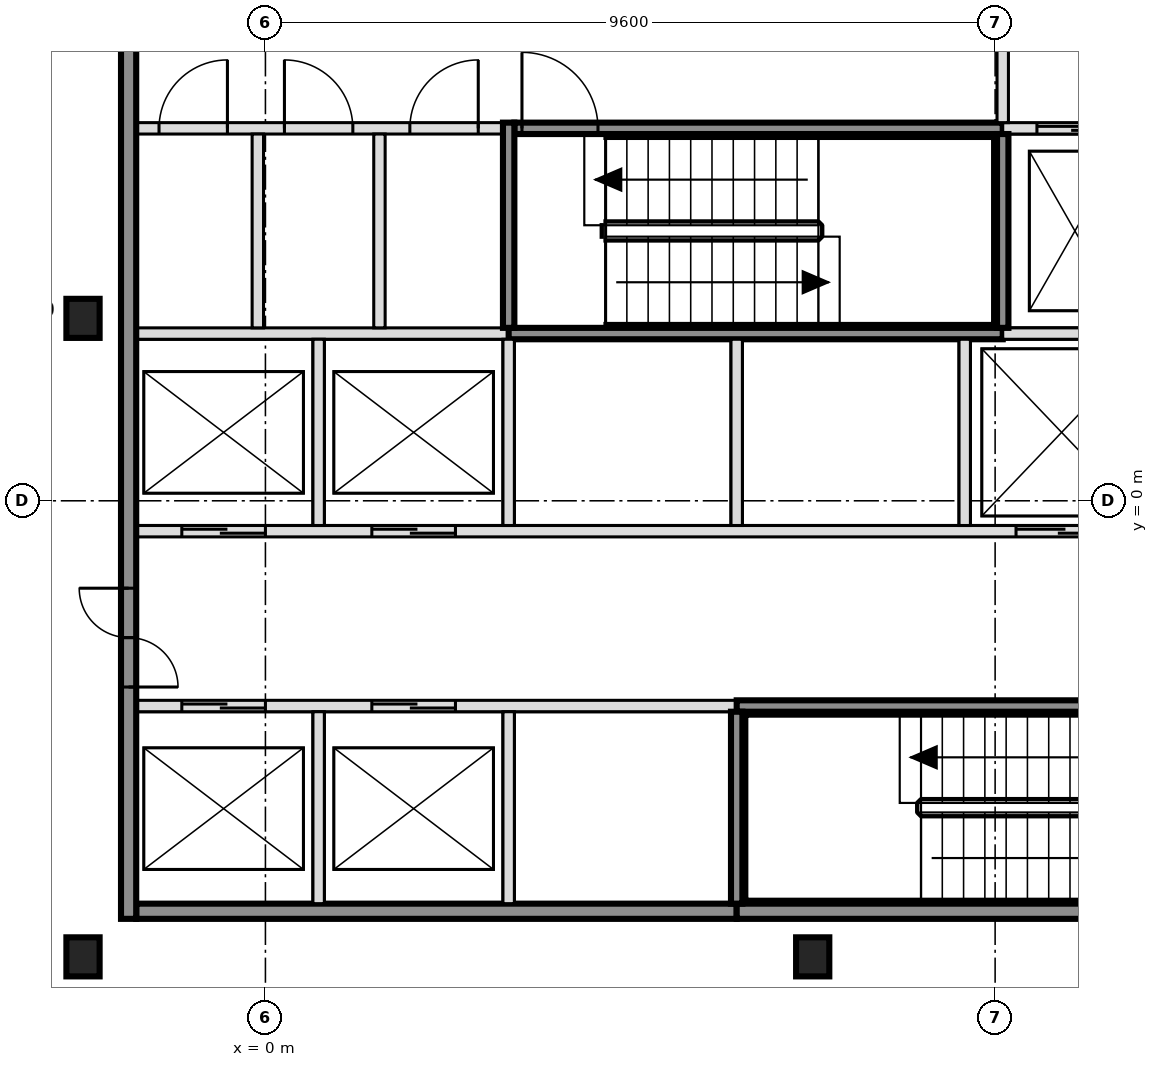
"""IFC4 building model, lengths in metres.
Left out: names, types, materials, properties, quantities, classifications, styles, units other than length and angle.
Written with IfcOpenShell. Run it as: python <this file> out.ifc"""

import sys

from ifc_helpers import new_model, si_unit, direction, frame, frame_2d, origin, origin_2d, place, context, subcontext, project, spatial, rectangle, i_section, extrude, element, fill, save


model = new_model("IFC4")
c1 = context("Model", 3, precision=1e-05, world=origin(), true_north=direction((0.0, 1.0)))
c2 = subcontext(c1, "Body", "Model", "MODEL_VIEW")
j1 = project(units=[si_unit("LENGTHUNIT", "METRE"), si_unit("PLANEANGLEUNIT", "RADIAN")], contexts=[c1])
p1 = place(None, origin())
s1 = spatial("IfcSite", under=j1, at=p1, CompositionType="ELEMENT")
p2 = place(p1, origin())
s2 = spatial("IfcBuilding", under=s1, at=p2, CompositionType="ELEMENT")
p3 = place(p2, frame((0.0, 0.0, 76.2)))
s3 = spatial("IfcBuildingStorey", under=s2, at=p3, CompositionType="ELEMENT", Elevation=76.2)
for number, where, z_axis, x_axis in (
    (1, (-2.4, -6.0, -0.15), (0.0, 0.0, 1.0), (1.0, 0.0, 0.0)),
    (2, (7.2, -6.0, -0.15), (0.0, 0.0, 1.0), (1.0, 0.0, 0.0)),
    (3, (-2.4, 2.4, -0.15), (0.0, 0.0, 1.0), (1.0, 0.0, 0.0)),
):
    element("IfcColumn", number, at=place(p3, frame(where, z_axis=z_axis, x_axis=x_axis)), inside=s3, PredefinedType="COLUMN", context=c2, shape_type="SweptSolid", body=[
        extrude(i_section(OverallWidth=0.437, OverallDepth=0.514, WebThickness=0.061, FlangeThickness=0.097, FilletRadius=0.015, at=origin_2d()), origin(), (0.0, 0.0, 1.0), 3.6),
    ])
p4 = place(p3, frame((-1.7, -5.4, 0.0), z_axis=(0.0, 0.0, 1.0), x_axis=(1.0, 0.0, 0.0)))
e4 = element("IfcWall", 4, at=p4, inside=s3, PredefinedType="SOLIDWALL", context=c2, shape_type="SweptSolid", body=[
    extrude(rectangle(XDim=7.9, YDim=0.2, at=frame_2d((3.95, 0.0))), origin(), (0.0, 0.0, 1.0), 3.45),
])
p5 = place(p3, frame((6.2, -5.4, 0.0), z_axis=(0.0, 0.0, 1.0), x_axis=(1.0, 0.0, 0.0)))
e5 = element("IfcWall", 5, at=p5, inside=s3, PredefinedType="SOLIDWALL", context=c2, shape_type="SweptSolid", body=[
    extrude(rectangle(XDim=6.5, YDim=0.2, at=frame_2d((3.25, 0.0))), origin(), (0.0, 0.0, 1.0), 3.45),
])
p6 = place(p3, frame((-1.7, -2.7, 0.0), z_axis=(0.0, 0.0, 1.0), x_axis=(1.0, 0.0, 0.0)))
e6 = element("IfcWall", 6, at=p6, inside=s3, PredefinedType="SOLIDWALL", context=c2, shape_type="SweptSolid", body=[
    extrude(rectangle(XDim=7.9, YDim=0.15, at=frame_2d((3.95, 0.0))), origin(), (0.0, 0.0, 1.0), 3.45),
])
p7 = place(p6, frame((0.6, 0.0, 0.0)))
e7 = element("IfcOpeningElement", 7, at=p7, cuts=e6, PredefinedType="OPENING", context=c2, shape_type="SweptSolid", body=[
    extrude(rectangle(XDim=1.1, YDim=2.1, at=frame_2d((0.55, 1.05))), frame((0.0, 0.085, 0.0), z_axis=(0.0, -1.0, 0.0), x_axis=(1.0, 0.0, 0.0)), (0.0, 0.0, 1.0), 0.17),
])
p8 = place(p6, frame((3.1, 0.0, 0.0)))
e8 = element("IfcOpeningElement", 8, at=p8, cuts=e6, PredefinedType="OPENING", context=c2, shape_type="SweptSolid", body=[
    extrude(rectangle(XDim=1.1, YDim=2.1, at=frame_2d((0.55, 1.05))), frame((0.0, 0.085, 0.0), z_axis=(0.0, -1.0, 0.0), x_axis=(1.0, 0.0, 0.0)), (0.0, 0.0, 1.0), 0.17),
])
p9 = place(p3, frame((6.2, -2.7, 0.0), z_axis=(0.0, 0.0, 1.0), x_axis=(1.0, 0.0, 0.0)))
e9 = element("IfcWall", 9, at=p9, inside=s3, PredefinedType="SOLIDWALL", context=c2, shape_type="SweptSolid", body=[
    extrude(rectangle(XDim=6.425, YDim=0.15, at=frame_2d((3.212, 0.0))), origin(), (0.0, 0.0, 1.0), 3.45),
])
p10 = place(p9, frame((5.3, 0.0, 0.0)))
e10 = element("IfcOpeningElement", 10, at=p10, cuts=e9, PredefinedType="OPENING", context=c2, shape_type="SweptSolid", body=[
    extrude(rectangle(XDim=1.0, YDim=2.1, at=frame_2d((0.5, 1.05))), frame((0.0, 0.085, 0.0), z_axis=(0.0, -1.0, 0.0), x_axis=(1.0, 0.0, 0.0)), (0.0, 0.0, 1.0), 0.17),
])
p11 = place(p3, frame((-1.7, -0.4, 0.0), z_axis=(0.0, 0.0, 1.0), x_axis=(1.0, 0.0, 0.0)))
e11 = element("IfcWall", 11, at=p11, inside=s3, PredefinedType="SOLIDWALL", context=c2, shape_type="SweptSolid", body=[
    extrude(rectangle(XDim=15.925, YDim=0.15, at=frame_2d((7.962, 0.0))), origin(), (0.0, 0.0, 1.0), 3.45),
])
p12 = place(p11, frame((0.6, 0.0, 0.0)))
e12 = element("IfcOpeningElement", 12, at=p12, cuts=e11, PredefinedType="OPENING", context=c2, shape_type="SweptSolid", body=[
    extrude(rectangle(XDim=1.1, YDim=2.1, at=frame_2d((0.55, 1.05))), frame((0.0, 0.085, 0.0), z_axis=(0.0, -1.0, 0.0), x_axis=(1.0, 0.0, 0.0)), (0.0, 0.0, 1.0), 0.17),
])
p13 = place(p11, frame((3.1, 0.0, 0.0)))
e13 = element("IfcOpeningElement", 13, at=p13, cuts=e11, PredefinedType="OPENING", context=c2, shape_type="SweptSolid", body=[
    extrude(rectangle(XDim=1.1, YDim=2.1, at=frame_2d((0.55, 1.05))), frame((0.0, 0.085, 0.0), z_axis=(0.0, -1.0, 0.0), x_axis=(1.0, 0.0, 0.0)), (0.0, 0.0, 1.0), 0.17),
])
p14 = place(p11, frame((11.575, 0.0, 0.0)))
e14 = element("IfcOpeningElement", 14, at=p14, cuts=e11, PredefinedType="OPENING", context=c2, shape_type="SweptSolid", body=[
    extrude(rectangle(XDim=1.2, YDim=2.1, at=frame_2d((0.6, 1.05))), frame((0.0, 0.085, 0.0), z_axis=(0.0, -1.0, 0.0), x_axis=(1.0, 0.0, 0.0)), (0.0, 0.0, 1.0), 0.17),
])
p15 = place(p11, frame((14.125, 0.0, 0.0)))
e15 = element("IfcOpeningElement", 15, at=p15, cuts=e11, PredefinedType="OPENING", context=c2, shape_type="SweptSolid", body=[
    extrude(rectangle(XDim=1.2, YDim=2.1, at=frame_2d((0.6, 1.05))), frame((0.0, 0.085, 0.0), z_axis=(0.0, -1.0, 0.0), x_axis=(1.0, 0.0, 0.0)), (0.0, 0.0, 1.0), 0.17),
])
p16 = place(p3, frame((-1.7, 2.2, 0.0), z_axis=(0.0, 0.0, 1.0), x_axis=(1.0, 0.0, 0.0)))
e16 = element("IfcWall", 16, at=p16, inside=s3, PredefinedType="SOLIDWALL", context=c2, shape_type="SweptSolid", body=[
    extrude(rectangle(XDim=4.9, YDim=0.15, at=frame_2d((2.45, 0.0))), origin(), (0.0, 0.0, 1.0), 3.45),
])
p17 = place(p3, frame((3.2, 2.2, 0.0), z_axis=(0.0, 0.0, 1.0), x_axis=(1.0, 0.0, 0.0)))
e17 = element("IfcWall", 17, at=p17, inside=s3, PredefinedType="SOLIDWALL", context=c2, shape_type="SweptSolid", body=[
    extrude(rectangle(XDim=6.5, YDim=0.15, at=frame_2d((3.25, 0.0))), origin(), (0.0, 0.0, 1.0), 3.45),
])
p18 = place(p3, frame((9.7, 2.2, 0.0), z_axis=(0.0, 0.0, 1.0), x_axis=(1.0, 0.0, 0.0)))
e18 = element("IfcWall", 18, at=p18, inside=s3, PredefinedType="SOLIDWALL", context=c2, shape_type="SweptSolid", body=[
    extrude(rectangle(XDim=4.525, YDim=0.15, at=frame_2d((2.263, 0.0))), origin(), (0.0, 0.0, 1.0), 3.45),
])
p19 = place(p3, frame((-1.7, 4.9, 0.0), z_axis=(0.0, 0.0, 1.0), x_axis=(1.0, 0.0, 0.0)))
e19 = element("IfcWall", 19, at=p19, inside=s3, PredefinedType="PARTITIONING", context=c2, shape_type="SweptSolid", body=[
    extrude(rectangle(XDim=4.825, YDim=0.15, at=frame_2d((2.413, 0.0))), origin(), (0.0, 0.0, 1.0), 3.45),
])
p20 = place(p19, frame((0.3, 0.0, 0.0)))
e20 = element("IfcOpeningElement", 20, at=p20, cuts=e19, PredefinedType="OPENING", context=c2, shape_type="SweptSolid", body=[
    extrude(rectangle(XDim=0.9, YDim=2.1, at=frame_2d((0.45, 1.05))), frame((0.0, 0.085, 0.0), z_axis=(0.0, -1.0, 0.0), x_axis=(1.0, 0.0, 0.0)), (0.0, 0.0, 1.0), 0.17),
])
p21 = place(p19, frame((1.95, 0.0, 0.0)))
e21 = element("IfcOpeningElement", 21, at=p21, cuts=e19, PredefinedType="OPENING", context=c2, shape_type="SweptSolid", body=[
    extrude(rectangle(XDim=0.9, YDim=2.1, at=frame_2d((0.45, 1.05))), frame((0.0, 0.085, 0.0), z_axis=(0.0, -1.0, 0.0), x_axis=(1.0, 0.0, 0.0)), (0.0, 0.0, 1.0), 0.17),
])
p22 = place(p19, frame((3.6, 0.0, 0.0)))
e22 = element("IfcOpeningElement", 22, at=p22, cuts=e19, PredefinedType="OPENING", context=c2, shape_type="SweptSolid", body=[
    extrude(rectangle(XDim=0.9, YDim=2.1, at=frame_2d((0.45, 1.05))), frame((0.0, 0.085, 0.0), z_axis=(0.0, -1.0, 0.0), x_axis=(1.0, 0.0, 0.0)), (0.0, 0.0, 1.0), 0.17),
])
p23 = place(p3, frame((3.275, 4.9, 0.0), z_axis=(0.0, 0.0, 1.0), x_axis=(1.0, 0.0, 0.0)))
e23 = element("IfcWall", 23, at=p23, inside=s3, PredefinedType="SOLIDWALL", context=c2, shape_type="SweptSolid", body=[
    extrude(rectangle(XDim=6.425, YDim=0.15, at=frame_2d((3.212, 0.0))), origin(), (0.0, 0.0, 1.0), 3.45),
])
p24 = place(p23, frame((0.1, 0.0, 0.0)))
e24 = element("IfcOpeningElement", 24, at=p24, cuts=e23, PredefinedType="OPENING", context=c2, shape_type="SweptSolid", body=[
    extrude(rectangle(XDim=1.0, YDim=2.1, at=frame_2d((0.5, 1.05))), frame((0.0, 0.085, 0.0), z_axis=(0.0, -1.0, 0.0), x_axis=(1.0, 0.0, 0.0)), (0.0, 0.0, 1.0), 0.17),
])
p25 = place(p3, frame((9.7, 4.9, 0.0), z_axis=(0.0, 0.0, 1.0), x_axis=(1.0, 0.0, 0.0)))
e25 = element("IfcWall", 25, at=p25, inside=s3, PredefinedType="SOLIDWALL", context=c2, shape_type="SweptSolid", body=[
    extrude(rectangle(XDim=6.4, YDim=0.15, at=frame_2d((3.2, 0.0))), origin(), (0.0, 0.0, 1.0), 3.45),
])
p26 = place(p25, frame((0.45, 0.0, 0.0)))
e26 = element("IfcOpeningElement", 26, at=p26, cuts=e25, PredefinedType="OPENING", context=c2, shape_type="SweptSolid", body=[
    extrude(rectangle(XDim=1.0, YDim=2.1, at=frame_2d((0.5, 1.05))), frame((0.0, 0.085, 0.0), z_axis=(0.0, -1.0, 0.0), x_axis=(1.0, 0.0, 0.0)), (0.0, 0.0, 1.0), 0.17),
])
p27 = place(p25, frame((2.35, 0.0, 0.0)))
e27 = element("IfcOpeningElement", 27, at=p27, cuts=e25, PredefinedType="OPENING", context=c2, shape_type="SweptSolid", body=[
    extrude(rectangle(XDim=1.0, YDim=2.1, at=frame_2d((0.5, 1.05))), frame((0.0, 0.085, 0.0), z_axis=(0.0, -1.0, 0.0), x_axis=(1.0, 0.0, 0.0)), (0.0, 0.0, 1.0), 0.17),
])
p28 = place(p25, frame((4.7, 0.0, 0.0)))
e28 = element("IfcOpeningElement", 28, at=p28, cuts=e25, PredefinedType="OPENING", context=c2, shape_type="SweptSolid", body=[
    extrude(rectangle(XDim=0.9, YDim=2.1, at=frame_2d((0.45, 1.05))), frame((0.0, 0.085, 0.0), z_axis=(0.0, -1.0, 0.0), x_axis=(1.0, 0.0, 0.0)), (0.0, 0.0, 1.0), 0.17),
])
p29 = place(p3, frame((-1.8, -5.5, 0.0), z_axis=(0.0, 0.0, 1.0), x_axis=(0.0, 1.0, 0.0)))
e29 = element("IfcWall", 29, at=p29, inside=s3, PredefinedType="SOLIDWALL", context=c2, shape_type="SweptSolid", body=[
    extrude(rectangle(XDim=15.8, YDim=0.2, at=frame_2d((7.9, 0.0))), origin(), (0.0, 0.0, 1.0), 3.45),
])
p30 = place(p29, frame((3.05, 0.0, 0.0)))
e30 = element("IfcOpeningElement", 30, at=p30, cuts=e29, PredefinedType="OPENING", context=c2, shape_type="SweptSolid", body=[
    extrude(rectangle(XDim=1.3, YDim=2.1, at=frame_2d((0.65, 1.05))), frame((0.0, 0.11, 0.0), z_axis=(0.0, -1.0, 0.0), x_axis=(1.0, 0.0, 0.0)), (0.0, 0.0, 1.0), 0.22),
])
p31 = place(p29, frame((11.45, 0.0, 0.0)))
e31 = element("IfcOpeningElement", 31, at=p31, cuts=e29, PredefinedType="OPENING", context=c2, shape_type="SweptSolid", body=[
    extrude(rectangle(XDim=1.3, YDim=2.1, at=frame_2d((0.65, 1.05))), frame((0.0, 0.11, 0.0), z_axis=(0.0, -1.0, 0.0), x_axis=(1.0, 0.0, 0.0)), (0.0, 0.0, 1.0), 0.22),
])
p32 = place(p3, frame((-0.1, 2.275, 0.0), z_axis=(0.0, 0.0, 1.0), x_axis=(0.0, 1.0, 0.0)))
e32 = element("IfcWall", 32, at=p32, inside=s3, PredefinedType="PARTITIONING", context=c2, shape_type="SweptSolid", body=[
    extrude(rectangle(XDim=2.55, YDim=0.15, at=frame_2d((1.275, 0.0))), origin(), (0.0, 0.0, 1.0), 3.45),
])
p33 = place(p3, frame((0.7, -5.3, 0.0), z_axis=(0.0, 0.0, 1.0), x_axis=(0.0, 1.0, 0.0)))
e33 = element("IfcWall", 33, at=p33, inside=s3, PredefinedType="SOLIDWALL", context=c2, shape_type="SweptSolid", body=[
    extrude(rectangle(XDim=2.525, YDim=0.15, at=frame_2d((1.263, 0.0))), origin(), (0.0, 0.0, 1.0), 3.45),
])
p34 = place(p3, frame((0.7, -0.325, 0.0), z_axis=(0.0, 0.0, 1.0), x_axis=(0.0, 1.0, 0.0)))
e34 = element("IfcWall", 34, at=p34, inside=s3, PredefinedType="SOLIDWALL", context=c2, shape_type="SweptSolid", body=[
    extrude(rectangle(XDim=2.45, YDim=0.15, at=frame_2d((1.225, 0.0))), origin(), (0.0, 0.0, 1.0), 3.45),
])
p35 = place(p3, frame((1.5, 2.275, 0.0), z_axis=(0.0, 0.0, 1.0), x_axis=(0.0, 1.0, 0.0)))
e35 = element("IfcWall", 35, at=p35, inside=s3, PredefinedType="PARTITIONING", context=c2, shape_type="SweptSolid", body=[
    extrude(rectangle(XDim=2.55, YDim=0.15, at=frame_2d((1.275, 0.0))), origin(), (0.0, 0.0, 1.0), 3.45),
])
p36 = place(p3, frame((3.2, -5.3, 0.0), z_axis=(0.0, 0.0, 1.0), x_axis=(0.0, 1.0, 0.0)))
e36 = element("IfcWall", 36, at=p36, inside=s3, PredefinedType="SOLIDWALL", context=c2, shape_type="SweptSolid", body=[
    extrude(rectangle(XDim=2.525, YDim=0.15, at=frame_2d((1.263, 0.0))), origin(), (0.0, 0.0, 1.0), 3.45),
])
p37 = place(p3, frame((3.2, -0.325, 0.0), z_axis=(0.0, 0.0, 1.0), x_axis=(0.0, 1.0, 0.0)))
e37 = element("IfcWall", 37, at=p37, inside=s3, PredefinedType="SOLIDWALL", context=c2, shape_type="SweptSolid", body=[
    extrude(rectangle(XDim=2.45, YDim=0.15, at=frame_2d((1.225, 0.0))), origin(), (0.0, 0.0, 1.0), 3.45),
])
p38 = place(p3, frame((3.2, 2.275, 0.0), z_axis=(0.0, 0.0, 1.0), x_axis=(0.0, 1.0, 0.0)))
e38 = element("IfcWall", 38, at=p38, inside=s3, PredefinedType="SOLIDWALL", context=c2, shape_type="SweptSolid", body=[
    extrude(rectangle(XDim=2.7, YDim=0.15, at=frame_2d((1.35, 0.0))), origin(), (0.0, 0.0, 1.0), 3.45),
])
p39 = place(p3, frame((6.2, -5.3, 0.0), z_axis=(0.0, 0.0, 1.0), x_axis=(0.0, 1.0, 0.0)))
e39 = element("IfcWall", 39, at=p39, inside=s3, PredefinedType="SOLIDWALL", context=c2, shape_type="SweptSolid", body=[
    extrude(rectangle(XDim=2.525, YDim=0.15, at=frame_2d((1.263, 0.0))), origin(), (0.0, 0.0, 1.0), 3.45),
])
for number, where, z_axis, x_axis in (
    (40, (6.2, -0.325, 0.0), (0.0, 0.0, 1.0), (0.0, 1.0, 0.0)),
    (41, (9.2, -0.325, 0.0), (0.0, 0.0, 1.0), (0.0, 1.0, 0.0)),
):
    element("IfcWall", number, at=place(p3, frame(where, z_axis=z_axis, x_axis=x_axis)), inside=s3, PredefinedType="SOLIDWALL", context=c2, shape_type="SweptSolid", body=[
        extrude(rectangle(XDim=2.45, YDim=0.15, at=frame_2d((1.225, 0.0))), origin(), (0.0, 0.0, 1.0), 3.45),
    ])
p40 = place(p3, frame((9.7, 2.275, 0.0), z_axis=(0.0, 0.0, 1.0), x_axis=(0.0, 1.0, 0.0)))
e42 = element("IfcWall", 42, at=p40, inside=s3, PredefinedType="SOLIDWALL", context=c2, shape_type="SweptSolid", body=[
    extrude(rectangle(XDim=2.55, YDim=0.15, at=frame_2d((1.275, 0.0))), origin(), (0.0, 0.0, 1.0), 3.45),
])
p41 = place(p3, frame((9.7, 4.975, 0.0), z_axis=(0.0, 0.0, 1.0), x_axis=(0.0, 1.0, 0.0)))
e43 = element("IfcWall", 43, at=p41, inside=s3, PredefinedType="SOLIDWALL", context=c2, shape_type="SweptSolid", body=[
    extrude(rectangle(XDim=2.45, YDim=0.15, at=frame_2d((1.225, 0.0))), origin(), (0.0, 0.0, 1.0), 3.45),
])
p42 = place(p7, origin())
e44 = element("IfcDoor", 44, at=p42, inside=s3, OperationType="DOUBLE_DOOR_SLIDING", PredefinedType="DOOR", context=c2, shape_type="SweptSolid", body=[
    extrude(rectangle(XDim=1.1, YDim=2.1, at=frame_2d((0.55, 1.05))), frame((0.0, 0.025, 0.0), z_axis=(0.0, -1.0, 0.0), x_axis=(1.0, 0.0, 0.0)), (0.0, 0.0, 1.0), 0.05),
])
fill(e7, e44)
p43 = place(p8, origin())
e45 = element("IfcDoor", 45, at=p43, inside=s3, OperationType="DOUBLE_DOOR_SLIDING", PredefinedType="DOOR", context=c2, shape_type="SweptSolid", body=[
    extrude(rectangle(XDim=1.1, YDim=2.1, at=frame_2d((0.55, 1.05))), frame((0.0, 0.025, 0.0), z_axis=(0.0, -1.0, 0.0), x_axis=(1.0, 0.0, 0.0)), (0.0, 0.0, 1.0), 0.05),
])
fill(e8, e45)
p44 = place(p12, origin())
e46 = element("IfcDoor", 46, at=p44, inside=s3, OperationType="DOUBLE_DOOR_SLIDING", PredefinedType="DOOR", context=c2, shape_type="SweptSolid", body=[
    extrude(rectangle(XDim=1.1, YDim=2.1, at=frame_2d((0.55, 1.05))), frame((0.0, 0.025, 0.0), z_axis=(0.0, -1.0, 0.0), x_axis=(1.0, 0.0, 0.0)), (0.0, 0.0, 1.0), 0.05),
])
fill(e12, e46)
p45 = place(p13, origin())
e47 = element("IfcDoor", 47, at=p45, inside=s3, OperationType="DOUBLE_DOOR_SLIDING", PredefinedType="DOOR", context=c2, shape_type="SweptSolid", body=[
    extrude(rectangle(XDim=1.1, YDim=2.1, at=frame_2d((0.55, 1.05))), frame((0.0, 0.025, 0.0), z_axis=(0.0, -1.0, 0.0), x_axis=(1.0, 0.0, 0.0)), (0.0, 0.0, 1.0), 0.05),
])
fill(e13, e47)
p46 = place(p14, origin())
e48 = element("IfcDoor", 48, at=p46, inside=s3, OperationType="DOUBLE_DOOR_SLIDING", PredefinedType="DOOR", context=c2, shape_type="SweptSolid", body=[
    extrude(rectangle(XDim=1.2, YDim=2.1, at=frame_2d((0.6, 1.05))), frame((0.0, 0.025, 0.0), z_axis=(0.0, -1.0, 0.0), x_axis=(1.0, 0.0, 0.0)), (0.0, 0.0, 1.0), 0.05),
])
fill(e14, e48)
p47 = place(p26, origin())
e49 = element("IfcDoor", 49, at=p47, inside=s3, OperationType="DOUBLE_DOOR_SLIDING", PredefinedType="DOOR", context=c2, shape_type="SweptSolid", body=[
    extrude(rectangle(XDim=1.0, YDim=2.1, at=frame_2d((0.5, 1.05))), frame((0.0, 0.025, 0.0), z_axis=(0.0, -1.0, 0.0), x_axis=(1.0, 0.0, 0.0)), (0.0, 0.0, 1.0), 0.05),
])
fill(e26, e49)
p48 = place(p24, origin())
e50 = element("IfcDoor", 50, at=p48, inside=s3, OperationType="SINGLE_SWING_LEFT", PredefinedType="DOOR", context=c2, shape_type="SweptSolid", body=[
    extrude(rectangle(XDim=1.0, YDim=2.1, at=frame_2d((0.5, 1.05))), frame((0.0, 0.025, 0.0), z_axis=(0.0, -1.0, 0.0), x_axis=(1.0, 0.0, 0.0)), (0.0, 0.0, 1.0), 0.05),
])
fill(e24, e50)
p49 = place(p30, origin())
e51 = element("IfcDoor", 51, at=p49, inside=s3, OperationType="DOUBLE_DOOR_SINGLE_SWING", PredefinedType="DOOR", context=c2, shape_type="SweptSolid", body=[
    extrude(rectangle(XDim=1.3, YDim=2.1, at=frame_2d((0.65, 1.05))), frame((0.0, 0.025, 0.0), z_axis=(0.0, -1.0, 0.0), x_axis=(1.0, 0.0, 0.0)), (0.0, 0.0, 1.0), 0.05),
])
fill(e30, e51)
p50 = place(p20, origin())
e52 = element("IfcDoor", 52, at=p50, inside=s3, OperationType="SINGLE_SWING_RIGHT", PredefinedType="DOOR", context=c2, shape_type="SweptSolid", body=[
    extrude(rectangle(XDim=0.9, YDim=2.1, at=frame_2d((0.45, 1.05))), frame((0.0, 0.025, 0.0), z_axis=(0.0, -1.0, 0.0), x_axis=(1.0, 0.0, 0.0)), (0.0, 0.0, 1.0), 0.05),
])
fill(e20, e52)
p51 = place(p21, origin())
e53 = element("IfcDoor", 53, at=p51, inside=s3, OperationType="SINGLE_SWING_LEFT", PredefinedType="DOOR", context=c2, shape_type="SweptSolid", body=[
    extrude(rectangle(XDim=0.9, YDim=2.1, at=frame_2d((0.45, 1.05))), frame((0.0, 0.025, 0.0), z_axis=(0.0, -1.0, 0.0), x_axis=(1.0, 0.0, 0.0)), (0.0, 0.0, 1.0), 0.05),
])
fill(e21, e53)
p52 = place(p22, origin())
e54 = element("IfcDoor", 54, at=p52, inside=s3, OperationType="SINGLE_SWING_RIGHT", PredefinedType="DOOR", context=c2, shape_type="SweptSolid", body=[
    extrude(rectangle(XDim=0.9, YDim=2.1, at=frame_2d((0.45, 1.05))), frame((0.0, 0.025, 0.0), z_axis=(0.0, -1.0, 0.0), x_axis=(1.0, 0.0, 0.0)), (0.0, 0.0, 1.0), 0.05),
])
fill(e22, e54)
save(model, sys.argv[1])
